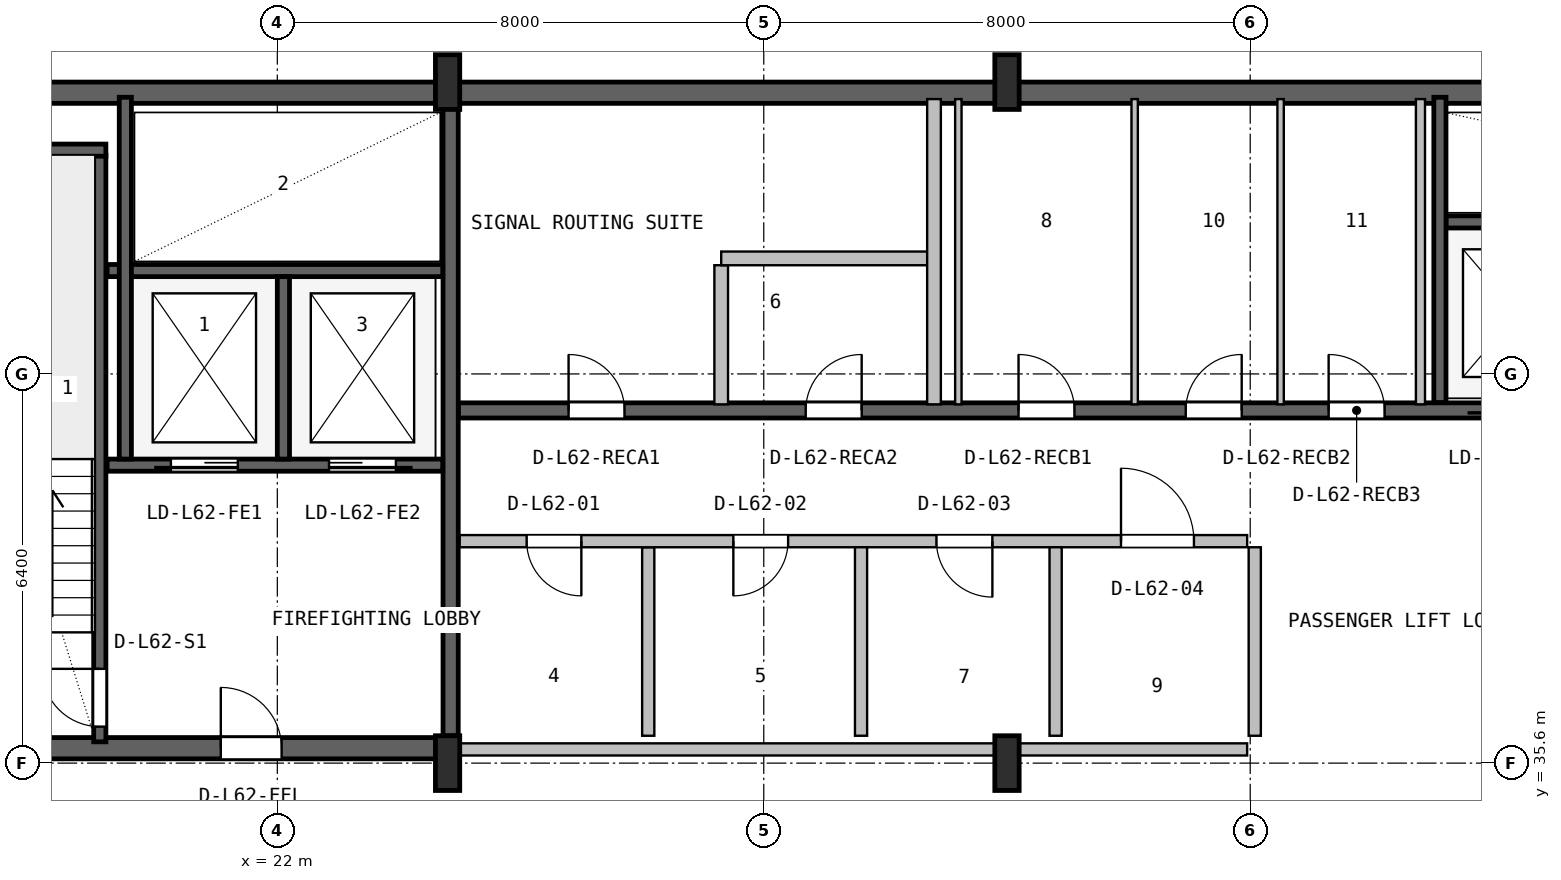
"""IFC4 building model, lengths in metres.
Left out: names, types, materials, properties, quantities, classifications, styles, units other than length and angle.
Written with IfcOpenShell. Run it as: python <this file> out.ifc"""

import sys

from ifc_helpers import new_model, si_unit, direction, frame, frame_2d, origin, origin_2d, place, context, subcontext, project, spatial, rectangle, i_section, extrude, source, transform, mapped, element, fill, save


model = new_model("IFC4")
c1 = context("Model", 3, precision=1e-05, world=origin(), true_north=direction((0.0, 1.0)))
c2 = subcontext(c1, "Body", "Model", "MODEL_VIEW")
j1 = project(units=[si_unit("LENGTHUNIT", "METRE"), si_unit("PLANEANGLEUNIT", "RADIAN")], contexts=[c1])
p1 = place(None, origin())
s1 = spatial("IfcSite", under=j1, at=p1, CompositionType="ELEMENT")
p2 = place(p1, origin())
s2 = spatial("IfcBuilding", under=s1, at=p2, CompositionType="ELEMENT")
p3 = place(p2, frame((0.0, 0.0, 250.8)))
s3 = spatial("IfcBuildingStorey", under=s2, at=p3, CompositionType="ELEMENT", Elevation=250.8)
p4 = place(p3, frame((15.6, 46.625, 0.0), z_axis=(0.0, 0.0, 1.0), x_axis=(1.0, 0.0, 0.0)))
e1 = element("IfcWall", 1, at=p4, inside=s3, PredefinedType="SHEAR", context=c2, shape_type="SweptSolid", body=[
    extrude(rectangle(XDim=36.8, YDim=0.35, at=frame_2d((18.4, 0.0))), origin(), (0.0, 0.0, 1.0), 3.55),
])
p5 = place(p3, frame((15.67, 35.845, 0.0), z_axis=(0.0, 0.0, 1.0), x_axis=(1.0, 0.0, 0.0)))
e2 = element("IfcWall", 2, at=p5, inside=s3, PredefinedType="SHEAR", context=c2, shape_type="SweptSolid", body=[
    extrude(rectangle(XDim=9.13, YDim=0.35, at=frame_2d((4.565, 0.0))), origin(), (0.0, 0.0, 1.0), 3.55),
])
p6 = place(p5, frame((5.4, 0.0, 0.0)))
e3 = element("IfcOpeningElement", 3, at=p6, cuts=e2, PredefinedType="OPENING", context=c2, shape_type="SweptSolid", body=[
    extrude(rectangle(XDim=1.0, YDim=2.1, at=frame_2d((0.5, 1.05))), frame((0.0, 0.185, 0.0), z_axis=(0.0, -1.0, 0.0), x_axis=(1.0, 0.0, 0.0)), (0.0, 0.0, 1.0), 0.37),
])
m1 = source(origin(), c2, "Body", "SweptSolid", [
    extrude(i_section(OverallWidth=0.4, OverallDepth=0.9, WebThickness=0.016, FlangeThickness=0.028, FilletRadius=0.016, at=origin_2d()), origin(), (0.0, 0.0, 1.0), 3.8),
])
for number, where, z_axis, x_axis in (
    (4, (24.8, 35.6, 0.0), (0.0, 0.0, 1.0), (1.0, 0.0, 0.0)),
    (5, (24.8, 46.8, 0.0), (0.0, 0.0, 1.0), (1.0, 0.0, 0.0)),
    (6, (34.0, 35.6, 0.0), (0.0, 0.0, 1.0), (1.0, 0.0, 0.0)),
    (7, (34.0, 46.8, 0.0), (0.0, 0.0, 1.0), (1.0, 0.0, 0.0)),
):
    element("IfcColumn", number, at=place(p3, frame(where, z_axis=z_axis, x_axis=x_axis)), inside=s3, PredefinedType="COLUMN", context=c2, shape_type="MappedRepresentation", body=[
        mapped(m1, transform((0.0, 0.0, 0.0), x_axis=(1.0, 0.0, 0.0), y_axis=(0.0, 1.0, 0.0), z_axis=(0.0, 0.0, 1.0), scale=1.0)),
    ])
p7 = place(p3, frame((19.08, 35.95, 0.0), z_axis=(0.0, 0.0, 1.0), x_axis=(0.0, 1.0, 0.0)))
e8 = element("IfcWall", 8, at=p7, inside=s3, PredefinedType="SHEAR", context=c2, shape_type="SweptSolid", body=[
    extrude(rectangle(XDim=9.65, YDim=0.2, at=frame_2d((4.825, 0.0))), origin(), (0.0, 0.0, 1.0), 3.55),
])
p8 = place(p7, frame((0.25, 0.0, 0.0)))
e9 = element("IfcOpeningElement", 9, at=p8, cuts=e8, PredefinedType="OPENING", context=c2, shape_type="SweptSolid", body=[
    extrude(rectangle(XDim=0.95, YDim=2.1, at=frame_2d((0.475, 1.05))), frame((0.0, 0.11, 0.0), z_axis=(0.0, -1.0, 0.0), x_axis=(1.0, 0.0, 0.0)), (0.0, 0.0, 1.0), 0.22),
])
p9 = place(p3, frame((15.95, 45.68, 0.0), z_axis=(0.0, 0.0, 1.0), x_axis=(1.0, 0.0, 0.0)))
e10 = element("IfcWall", 10, at=p9, inside=s3, PredefinedType="SHEAR", context=c2, shape_type="SweptSolid", body=[
    extrude(rectangle(XDim=3.23, YDim=0.2, at=frame_2d((1.615, 0.0))), origin(), (0.0, 0.0, 1.0), 3.55),
])
p10 = place(p3, frame((24.85, 36.05, 0.0), z_axis=(0.0, 0.0, 1.0), x_axis=(0.0, 1.0, 0.0)))
e11 = element("IfcWall", 11, at=p10, inside=s3, PredefinedType="SHEAR", context=c2, shape_type="SweptSolid", body=[
    extrude(rectangle(XDim=10.45, YDim=0.25, at=frame_2d((5.225, 0.0))), origin(), (0.0, 0.0, 1.0), 3.55),
])
p11 = place(p3, frame((19.2, 40.5, 0.0), z_axis=(0.0, 0.0, 1.0), x_axis=(1.0, 0.0, 0.0)))
e12 = element("IfcWall", 12, at=p11, inside=s3, PredefinedType="SHEAR", context=c2, shape_type="SweptSolid", body=[
    extrude(rectangle(XDim=5.52, YDim=0.2, at=frame_2d((2.76, 0.0))), origin(), (0.0, 0.0, 1.0), 3.55),
])
p12 = place(p11, frame((1.05, 0.0, 0.0)))
e13 = element("IfcOpeningElement", 13, at=p12, cuts=e12, PredefinedType="OPENING", context=c2, shape_type="SweptSolid", body=[
    extrude(rectangle(XDim=1.1, YDim=2.18, at=frame_2d((0.55, 1.09))), frame((0.0, 0.11, 0.0), z_axis=(0.0, -1.0, 0.0), x_axis=(1.0, 0.0, 0.0)), (0.0, 0.0, 1.0), 0.22),
])
p13 = place(p11, frame((3.65, 0.0, 0.0)))
e14 = element("IfcOpeningElement", 14, at=p13, cuts=e12, PredefinedType="OPENING", context=c2, shape_type="SweptSolid", body=[
    extrude(rectangle(XDim=1.1, YDim=2.18, at=frame_2d((0.55, 1.09))), frame((0.0, 0.11, 0.0), z_axis=(0.0, -1.0, 0.0), x_axis=(1.0, 0.0, 0.0)), (0.0, 0.0, 1.0), 0.22),
])
p14 = place(p3, frame((19.2, 43.7, 0.0), z_axis=(0.0, 0.0, 1.0), x_axis=(1.0, 0.0, 0.0)))
e15 = element("IfcWall", 15, at=p14, inside=s3, PredefinedType="SHEAR", context=c2, shape_type="SweptSolid", body=[
    extrude(rectangle(XDim=5.52, YDim=0.2, at=frame_2d((2.76, 0.0))), origin(), (0.0, 0.0, 1.0), 3.55),
])
p15 = place(p3, frame((22.1, 40.6, 0.0), z_axis=(0.0, 0.0, 1.0), x_axis=(0.0, 1.0, 0.0)))
e16 = element("IfcWall", 16, at=p15, inside=s3, PredefinedType="SHEAR", context=c2, shape_type="SweptSolid", body=[
    extrude(rectangle(XDim=3.0, YDim=0.2, at=frame_2d((1.5, 0.0))), origin(), (0.0, 0.0, 1.0), 3.55),
])
p16 = place(p3, frame((19.5, 40.6, 0.0), z_axis=(0.0, 0.0, 1.0), x_axis=(0.0, 1.0, 0.0)))
e17 = element("IfcWall", 17, at=p16, inside=s3, PredefinedType="SHEAR", context=c2, shape_type="SweptSolid", body=[
    extrude(rectangle(XDim=5.95, YDim=0.2, at=frame_2d((2.975, 0.0))), origin(), (0.0, 0.0, 1.0), 3.55),
])
p17 = place(p3, frame((24.98, 41.4, 0.0), z_axis=(0.0, 0.0, 1.0), x_axis=(1.0, 0.0, 0.0)))
e18 = element("IfcWall", 18, at=p17, inside=s3, PredefinedType="SHEAR", context=c2, shape_type="SweptSolid", body=[
    extrude(rectangle(XDim=23.82, YDim=0.25, at=frame_2d((11.91, 0.0))), origin(), (0.0, 0.0, 1.0), 3.55),
])
p18 = place(p17, frame((16.87, 0.0, 0.0)))
e19 = element("IfcOpeningElement", 19, at=p18, cuts=e18, PredefinedType="OPENING", context=c2, shape_type="SweptSolid", body=[
    extrude(rectangle(XDim=1.1, YDim=2.18, at=frame_2d((0.55, 1.09))), frame((0.0, 0.135, 0.0), z_axis=(0.0, -1.0, 0.0), x_axis=(1.0, 0.0, 0.0)), (0.0, 0.0, 1.0), 0.27),
])
p19 = place(p17, frame((19.47, 0.0, 0.0)))
e20 = element("IfcOpeningElement", 20, at=p19, cuts=e18, PredefinedType="OPENING", context=c2, shape_type="SweptSolid", body=[
    extrude(rectangle(XDim=1.1, YDim=2.18, at=frame_2d((0.55, 1.09))), frame((0.0, 0.135, 0.0), z_axis=(0.0, -1.0, 0.0), x_axis=(1.0, 0.0, 0.0)), (0.0, 0.0, 1.0), 0.27),
])
p20 = place(p17, frame((22.07, 0.0, 0.0)))
e21 = element("IfcOpeningElement", 21, at=p20, cuts=e18, PredefinedType="OPENING", context=c2, shape_type="SweptSolid", body=[
    extrude(rectangle(XDim=1.1, YDim=2.18, at=frame_2d((0.55, 1.09))), frame((0.0, 0.135, 0.0), z_axis=(0.0, -1.0, 0.0), x_axis=(1.0, 0.0, 0.0)), (0.0, 0.0, 1.0), 0.27),
])
p21 = place(p17, frame((1.81, 0.0, 0.0)))
e22 = element("IfcOpeningElement", 22, at=p21, cuts=e18, PredefinedType="OPENING", context=c2, shape_type="SweptSolid", body=[
    extrude(rectangle(XDim=0.92, YDim=2.08, at=frame_2d((0.46, 1.04))), frame((0.0, 0.135, 0.0), z_axis=(0.0, -1.0, 0.0), x_axis=(1.0, 0.0, 0.0)), (0.0, 0.0, 1.0), 0.27),
])
p22 = place(p17, frame((5.71, 0.0, 0.0)))
e23 = element("IfcOpeningElement", 23, at=p22, cuts=e18, PredefinedType="OPENING", context=c2, shape_type="SweptSolid", body=[
    extrude(rectangle(XDim=0.92, YDim=2.08, at=frame_2d((0.46, 1.04))), frame((0.0, 0.135, 0.0), z_axis=(0.0, -1.0, 0.0), x_axis=(1.0, 0.0, 0.0)), (0.0, 0.0, 1.0), 0.27),
])
p23 = place(p17, frame((9.21, 0.0, 0.0)))
e24 = element("IfcOpeningElement", 24, at=p23, cuts=e18, PredefinedType="OPENING", context=c2, shape_type="SweptSolid", body=[
    extrude(rectangle(XDim=0.92, YDim=2.08, at=frame_2d((0.46, 1.04))), frame((0.0, 0.135, 0.0), z_axis=(0.0, -1.0, 0.0), x_axis=(1.0, 0.0, 0.0)), (0.0, 0.0, 1.0), 0.27),
])
p24 = place(p17, frame((11.96, 0.0, 0.0)))
e25 = element("IfcOpeningElement", 25, at=p24, cuts=e18, PredefinedType="OPENING", context=c2, shape_type="SweptSolid", body=[
    extrude(rectangle(XDim=0.92, YDim=2.08, at=frame_2d((0.46, 1.04))), frame((0.0, 0.135, 0.0), z_axis=(0.0, -1.0, 0.0), x_axis=(1.0, 0.0, 0.0)), (0.0, 0.0, 1.0), 0.27),
])
p25 = place(p17, frame((14.31, 0.0, 0.0)))
e26 = element("IfcOpeningElement", 26, at=p25, cuts=e18, PredefinedType="OPENING", context=c2, shape_type="SweptSolid", body=[
    extrude(rectangle(XDim=0.92, YDim=2.08, at=frame_2d((0.46, 1.04))), frame((0.0, 0.135, 0.0), z_axis=(0.0, -1.0, 0.0), x_axis=(1.0, 0.0, 0.0)), (0.0, 0.0, 1.0), 0.27),
])
p26 = place(p3, frame((41.22, 44.5, 0.0), z_axis=(0.0, 0.0, 1.0), x_axis=(1.0, 0.0, 0.0)))
e27 = element("IfcWall", 27, at=p26, inside=s3, PredefinedType="SHEAR", context=c2, shape_type="SweptSolid", body=[
    extrude(rectangle(XDim=7.58, YDim=0.2, at=frame_2d((3.79, 0.0))), origin(), (0.0, 0.0, 1.0), 3.55),
])
p27 = place(p3, frame((41.12, 41.53, 0.0), z_axis=(0.0, 0.0, 1.0), x_axis=(0.0, 1.0, 0.0)))
e28 = element("IfcWall", 28, at=p27, inside=s3, PredefinedType="SHEAR", context=c2, shape_type="SweptSolid", body=[
    extrude(rectangle(XDim=5.02, YDim=0.2, at=frame_2d((2.51, 0.0))), origin(), (0.0, 0.0, 1.0), 3.55),
])
p28 = place(p3, frame((25.0, 35.825, 0.0), z_axis=(0.0, 0.0, 1.0), x_axis=(1.0, 0.0, 0.0)))
e29 = element("IfcWall", 29, at=p28, inside=s3, PredefinedType="SOLIDWALL", context=c2, shape_type="SweptSolid", body=[
    extrude(rectangle(XDim=12.95, YDim=0.2, at=frame_2d((6.475, 0.0))), origin(), (0.0, 0.0, 1.0), 2.575),
])
p29 = place(p3, frame((28.1, 36.05, 0.0), z_axis=(0.0, 0.0, 1.0), x_axis=(0.0, 1.0, 0.0)))
e30 = element("IfcWall", 30, at=p29, inside=s3, PredefinedType="PLUMBINGWALL", context=c2, shape_type="SweptSolid", body=[
    extrude(rectangle(XDim=3.1, YDim=0.2, at=frame_2d((1.55, 0.0))), origin(), (0.0, 0.0, 1.0), 3.53),
])
p30 = place(p3, frame((25.0, 39.25, 0.0), z_axis=(0.0, 0.0, 1.0), x_axis=(1.0, 0.0, 0.0)))
e31 = element("IfcWall", 31, at=p30, inside=s3, PredefinedType="SOLIDWALL", context=c2, shape_type="SweptSolid", body=[
    extrude(rectangle(XDim=12.95, YDim=0.2, at=frame_2d((6.475, 0.0))), origin(), (0.0, 0.0, 1.0), 3.53),
])
p31 = place(p30, frame((1.1, 0.0, 0.0)))
e32 = element("IfcOpeningElement", 32, at=p31, cuts=e31, PredefinedType="OPENING", context=c2, shape_type="SweptSolid", body=[
    extrude(rectangle(XDim=0.9, YDim=2.06, at=frame_2d((0.45, 1.03))), frame((0.0, 0.11, 0.0), z_axis=(0.0, -1.0, 0.0), x_axis=(1.0, 0.0, 0.0)), (0.0, 0.0, 1.0), 0.22),
])
p32 = place(p30, frame((4.5, 0.0, 0.0)))
e33 = element("IfcOpeningElement", 33, at=p32, cuts=e31, PredefinedType="OPENING", context=c2, shape_type="SweptSolid", body=[
    extrude(rectangle(XDim=0.9, YDim=2.06, at=frame_2d((0.45, 1.03))), frame((0.0, 0.11, 0.0), z_axis=(0.0, -1.0, 0.0), x_axis=(1.0, 0.0, 0.0)), (0.0, 0.0, 1.0), 0.22),
])
p33 = place(p30, frame((7.84, 0.0, 0.0)))
e34 = element("IfcOpeningElement", 34, at=p33, cuts=e31, PredefinedType="OPENING", context=c2, shape_type="SweptSolid", body=[
    extrude(rectangle(XDim=0.92, YDim=2.08, at=frame_2d((0.46, 1.04))), frame((0.0, 0.11, 0.0), z_axis=(0.0, -1.0, 0.0), x_axis=(1.0, 0.0, 0.0)), (0.0, 0.0, 1.0), 0.22),
])
p34 = place(p30, frame((10.875, 0.0, 0.0)))
e35 = element("IfcOpeningElement", 35, at=p34, cuts=e31, PredefinedType="OPENING", context=c2, shape_type="SweptSolid", body=[
    extrude(rectangle(XDim=1.2, YDim=2.1, at=frame_2d((0.6, 1.05))), frame((0.0, 0.11, 0.0), z_axis=(0.0, -1.0, 0.0), x_axis=(1.0, 0.0, 0.0)), (0.0, 0.0, 1.0), 0.22),
])
p35 = place(p3, frame((31.6, 36.05, 0.0), z_axis=(0.0, 0.0, 1.0), x_axis=(0.0, 1.0, 0.0)))
e36 = element("IfcWall", 36, at=p35, inside=s3, PredefinedType="PLUMBINGWALL", context=c2, shape_type="SweptSolid", body=[
    extrude(rectangle(XDim=3.1, YDim=0.2, at=frame_2d((1.55, 0.0))), origin(), (0.0, 0.0, 1.0), 3.53),
])
for number, where, z_axis, x_axis in (
    (37, (34.8, 36.05, 0.0), (0.0, 0.0, 1.0), (0.0, 1.0, 0.0)),
    (38, (38.075, 36.05, 0.0), (0.0, 0.0, 1.0), (0.0, 1.0, 0.0)),
):
    element("IfcWall", number, at=place(p3, frame(where, z_axis=z_axis, x_axis=x_axis)), inside=s3, PredefinedType="SOLIDWALL", context=c2, shape_type="SweptSolid", body=[
        extrude(rectangle(XDim=3.1, YDim=0.2, at=frame_2d((1.55, 0.0))), origin(), (0.0, 0.0, 1.0), 3.53),
    ])
p36 = place(p3, frame((29.3, 41.5, 0.0), z_axis=(0.0, 0.0, 1.0), x_axis=(0.0, 1.0, 0.0)))
e39 = element("IfcWall", 39, at=p36, inside=s3, PredefinedType="PARTITIONING", context=c2, shape_type="SweptSolid", body=[
    extrude(rectangle(XDim=2.288, YDim=0.225, at=frame_2d((1.144, 0.0))), origin(), (0.0, 0.0, 1.0), 3.53),
])
p37 = place(p3, frame((29.3, 43.9, 0.0), z_axis=(0.0, 0.0, 1.0), x_axis=(1.0, 0.0, 0.0)))
e40 = element("IfcWall", 40, at=p37, inside=s3, PredefinedType="PARTITIONING", context=c2, shape_type="SweptSolid", body=[
    extrude(rectangle(XDim=3.5, YDim=0.225, at=frame_2d((1.75, 0.0))), origin(), (0.0, 0.0, 1.0), 3.53),
])
p38 = place(p3, frame((32.8, 41.5, 0.0), z_axis=(0.0, 0.0, 1.0), x_axis=(0.0, 1.0, 0.0)))
e41 = element("IfcWall", 41, at=p38, inside=s3, PredefinedType="PARTITIONING", context=c2, shape_type="SweptSolid", body=[
    extrude(rectangle(XDim=5.02, YDim=0.225, at=frame_2d((2.51, 0.0))), origin(), (0.0, 0.0, 1.0), 3.53),
])
for number, where, z_axis, x_axis in (
    (42, (36.1, 41.5, 0.0), (0.0, 0.0, 1.0), (0.0, 1.0, 0.0)),
    (43, (33.2, 41.5, 0.0), (0.0, 0.0, 1.0), (0.0, 1.0, 0.0)),
    (44, (38.5, 41.5, 0.0), (0.0, 0.0, 1.0), (0.0, 1.0, 0.0)),
):
    element("IfcWall", number, at=place(p3, frame(where, z_axis=z_axis, x_axis=x_axis)), inside=s3, PredefinedType="PARTITIONING", context=c2, shape_type="SweptSolid", body=[
        extrude(rectangle(XDim=5.02, YDim=0.105, at=frame_2d((2.51, 0.0))), origin(), (0.0, 0.0, 1.0), 3.53),
    ])
p39 = place(p3, frame((40.8, 41.5, 0.0), z_axis=(0.0, 0.0, 1.0), x_axis=(0.0, 1.0, 0.0)))
e45 = element("IfcWall", 45, at=p39, inside=s3, PredefinedType="PARTITIONING", context=c2, shape_type="SweptSolid", body=[
    extrude(rectangle(XDim=5.02, YDim=0.15, at=frame_2d((2.51, 0.0))), origin(), (0.0, 0.0, 1.0), 3.53),
])
m2 = source(origin(), c2, "Body", "SweptSolid", [
    extrude(rectangle(XDim=0.95, YDim=2.1, at=frame_2d((0.475, 1.05))), frame((0.0, 0.025, 0.0), z_axis=(0.0, -1.0, 0.0), x_axis=(1.0, 0.0, 0.0)), (0.0, 0.0, 1.0), 0.05),
])
p40 = place(p8, origin())
e46 = element("IfcDoor", 46, at=p40, inside=s3, OperationType="SINGLE_SWING_RIGHT", PredefinedType="DOOR", context=c2, shape_type="MappedRepresentation", body=[
    mapped(m2, transform((0.0, 0.0, 0.0), x_axis=(1.0, 0.0, 0.0), y_axis=(0.0, 1.0, 0.0), z_axis=(0.0, 0.0, 1.0), scale=1.0)),
])
fill(e9, e46)
m3 = source(origin(), c2, "Body", "SweptSolid", [
    extrude(rectangle(XDim=1.0, YDim=2.1, at=frame_2d((0.5, 1.05))), frame((0.0, 0.025, 0.0), z_axis=(0.0, -1.0, 0.0), x_axis=(1.0, 0.0, 0.0)), (0.0, 0.0, 1.0), 0.05),
])
p41 = place(p6, origin())
e47 = element("IfcDoor", 47, at=p41, inside=s3, OperationType="SINGLE_SWING_LEFT", PredefinedType="DOOR", context=c2, shape_type="MappedRepresentation", body=[
    mapped(m3, transform((0.0, 0.0, 0.0), x_axis=(1.0, 0.0, 0.0), y_axis=(0.0, 1.0, 0.0), z_axis=(0.0, 0.0, 1.0), scale=1.0)),
])
fill(e3, e47)
m4 = source(origin(), c2, "Body", "SweptSolid", [
    extrude(rectangle(XDim=1.1, YDim=2.18, at=frame_2d((0.55, 1.09))), frame((0.0, 0.025, 0.0), z_axis=(0.0, -1.0, 0.0), x_axis=(1.0, 0.0, 0.0)), (0.0, 0.0, 1.0), 0.05),
])
p42 = place(p12, frame((1.1, 0.0, 0.0), z_axis=(0.0, 0.0, 1.0), x_axis=(-1.0, 0.0, 0.0)))
e48 = element("IfcDoor", 48, at=p42, inside=s3, OperationType="SLIDING_TO_LEFT", PredefinedType="DOOR", context=c2, shape_type="MappedRepresentation", body=[
    mapped(m4, transform((0.0, 0.0, 0.0), x_axis=(1.0, 0.0, 0.0), y_axis=(0.0, 1.0, 0.0), z_axis=(0.0, 0.0, 1.0), scale=1.0)),
])
fill(e13, e48)
p43 = place(p13, frame((1.1, 0.0, 0.0), z_axis=(0.0, 0.0, 1.0), x_axis=(-1.0, 0.0, 0.0)))
e49 = element("IfcDoor", 49, at=p43, inside=s3, OperationType="SLIDING_TO_RIGHT", PredefinedType="DOOR", context=c2, shape_type="MappedRepresentation", body=[
    mapped(m4, transform((0.0, 0.0, 0.0), x_axis=(1.0, 0.0, 0.0), y_axis=(0.0, 1.0, 0.0), z_axis=(0.0, 0.0, 1.0), scale=1.0)),
])
fill(e14, e49)
m5 = source(origin(), c2, "Body", "SweptSolid", [
    extrude(rectangle(XDim=0.92, YDim=2.08, at=frame_2d((0.46, 1.04))), frame((0.0, 0.025, 0.0), z_axis=(0.0, -1.0, 0.0), x_axis=(1.0, 0.0, 0.0)), (0.0, 0.0, 1.0), 0.05),
])
p44 = place(p21, origin())
e50 = element("IfcDoor", 50, at=p44, inside=s3, OperationType="SINGLE_SWING_LEFT", PredefinedType="DOOR", context=c2, shape_type="MappedRepresentation", body=[
    mapped(m5, transform((0.0, 0.0, 0.0), x_axis=(1.0, 0.0, 0.0), y_axis=(0.0, 1.0, 0.0), z_axis=(0.0, 0.0, 1.0), scale=1.0)),
])
fill(e22, e50)
p45 = place(p22, origin())
e51 = element("IfcDoor", 51, at=p45, inside=s3, OperationType="SINGLE_SWING_RIGHT", PredefinedType="DOOR", context=c2, shape_type="MappedRepresentation", body=[
    mapped(m5, transform((0.0, 0.0, 0.0), x_axis=(1.0, 0.0, 0.0), y_axis=(0.0, 1.0, 0.0), z_axis=(0.0, 0.0, 1.0), scale=1.0)),
])
fill(e23, e51)
p46 = place(p23, origin())
e52 = element("IfcDoor", 52, at=p46, inside=s3, OperationType="SINGLE_SWING_LEFT", PredefinedType="DOOR", context=c2, shape_type="MappedRepresentation", body=[
    mapped(m5, transform((0.0, 0.0, 0.0), x_axis=(1.0, 0.0, 0.0), y_axis=(0.0, 1.0, 0.0), z_axis=(0.0, 0.0, 1.0), scale=1.0)),
])
fill(e24, e52)
p47 = place(p24, origin())
e53 = element("IfcDoor", 53, at=p47, inside=s3, OperationType="SINGLE_SWING_RIGHT", PredefinedType="DOOR", context=c2, shape_type="MappedRepresentation", body=[
    mapped(m5, transform((0.0, 0.0, 0.0), x_axis=(1.0, 0.0, 0.0), y_axis=(0.0, 1.0, 0.0), z_axis=(0.0, 0.0, 1.0), scale=1.0)),
])
fill(e25, e53)
p48 = place(p25, origin())
e54 = element("IfcDoor", 54, at=p48, inside=s3, OperationType="SINGLE_SWING_LEFT", PredefinedType="DOOR", context=c2, shape_type="MappedRepresentation", body=[
    mapped(m5, transform((0.0, 0.0, 0.0), x_axis=(1.0, 0.0, 0.0), y_axis=(0.0, 1.0, 0.0), z_axis=(0.0, 0.0, 1.0), scale=1.0)),
])
fill(e26, e54)
m6 = source(origin(), c2, "Body", "SweptSolid", [
    extrude(rectangle(XDim=0.9, YDim=2.06, at=frame_2d((0.45, 1.03))), frame((0.0, 0.025, 0.0), z_axis=(0.0, -1.0, 0.0), x_axis=(1.0, 0.0, 0.0)), (0.0, 0.0, 1.0), 0.05),
])
p49 = place(p31, frame((0.9, 0.0, 0.0), z_axis=(0.0, 0.0, 1.0), x_axis=(-1.0, 0.0, 0.0)))
e55 = element("IfcDoor", 55, at=p49, inside=s3, OperationType="SINGLE_SWING_RIGHT", PredefinedType="DOOR", context=c2, shape_type="MappedRepresentation", body=[
    mapped(m6, transform((0.0, 0.0, 0.0), x_axis=(1.0, 0.0, 0.0), y_axis=(0.0, 1.0, 0.0), z_axis=(0.0, 0.0, 1.0), scale=1.0)),
])
fill(e32, e55)
p50 = place(p32, frame((0.9, 0.0, 0.0), z_axis=(0.0, 0.0, 1.0), x_axis=(-1.0, 0.0, 0.0)))
e56 = element("IfcDoor", 56, at=p50, inside=s3, OperationType="SINGLE_SWING_LEFT", PredefinedType="DOOR", context=c2, shape_type="MappedRepresentation", body=[
    mapped(m6, transform((0.0, 0.0, 0.0), x_axis=(1.0, 0.0, 0.0), y_axis=(0.0, 1.0, 0.0), z_axis=(0.0, 0.0, 1.0), scale=1.0)),
])
fill(e33, e56)
p51 = place(p33, frame((0.92, 0.0, 0.0), z_axis=(0.0, 0.0, 1.0), x_axis=(-1.0, 0.0, 0.0)))
e57 = element("IfcDoor", 57, at=p51, inside=s3, OperationType="SINGLE_SWING_RIGHT", PredefinedType="DOOR", context=c2, shape_type="MappedRepresentation", body=[
    mapped(m5, transform((0.0, 0.0, 0.0), x_axis=(1.0, 0.0, 0.0), y_axis=(0.0, 1.0, 0.0), z_axis=(0.0, 0.0, 1.0), scale=1.0)),
])
fill(e34, e57)
m7 = source(origin(), c2, "Body", "SweptSolid", [
    extrude(rectangle(XDim=1.2, YDim=2.1, at=frame_2d((0.6, 1.05))), frame((0.0, 0.025, 0.0), z_axis=(0.0, -1.0, 0.0), x_axis=(1.0, 0.0, 0.0)), (0.0, 0.0, 1.0), 0.05),
])
p52 = place(p34, origin())
e58 = element("IfcDoor", 58, at=p52, inside=s3, OperationType="SINGLE_SWING_LEFT", PredefinedType="DOOR", context=c2, shape_type="MappedRepresentation", body=[
    mapped(m7, transform((0.0, 0.0, 0.0), x_axis=(1.0, 0.0, 0.0), y_axis=(0.0, 1.0, 0.0), z_axis=(0.0, 0.0, 1.0), scale=1.0)),
])
fill(e35, e58)
save(model, sys.argv[1])
